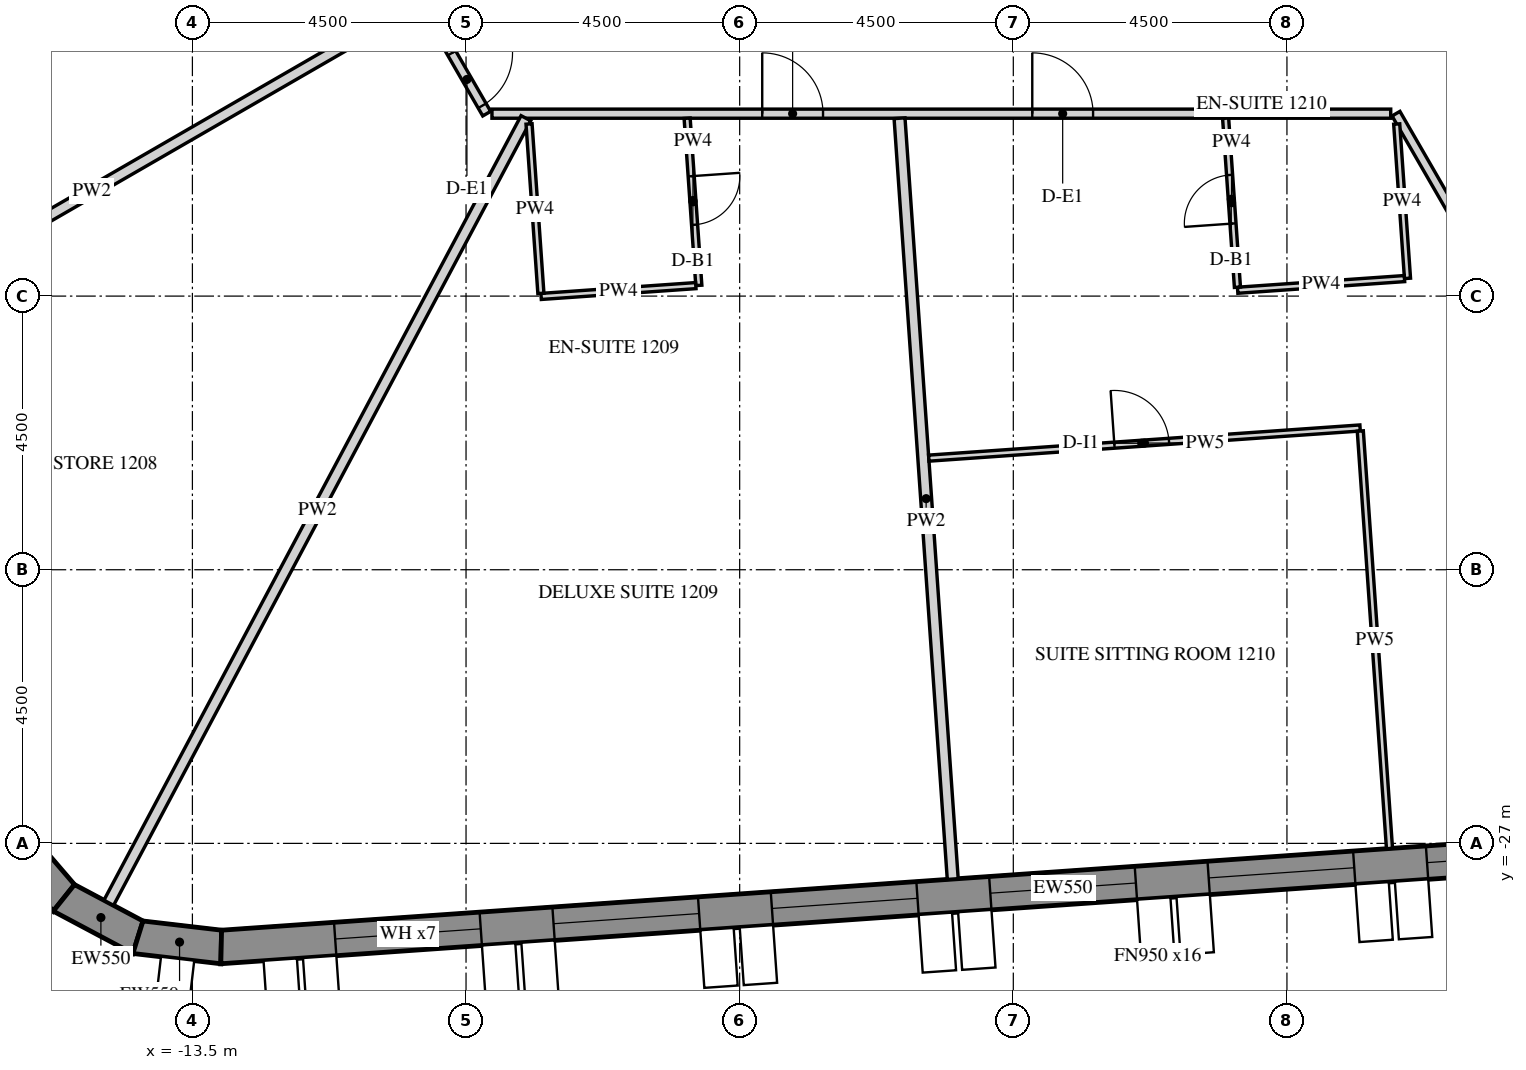
"""IFC4 building model, lengths in metres.
Left out: names, types, materials, properties, quantities, classifications, styles, units other than length and angle.
Written with IfcOpenShell. Run it as: python <this file> out.ifc"""

import sys

from ifc_helpers import new_model, si_unit, direction, frame, frame_2d, origin, place, context, subcontext, project, spatial, polyline, rectangle, outline, extrude, element, fill, save


model = new_model("IFC4")
c1 = context("Model", 3, precision=1e-05, world=origin(), true_north=direction((0.0, 1.0)))
c2 = subcontext(c1, "Body", "Model", "MODEL_VIEW")
j1 = project(units=[si_unit("LENGTHUNIT", "METRE"), si_unit("PLANEANGLEUNIT", "RADIAN")], contexts=[c1])
p1 = place(None, origin())
s1 = spatial("IfcSite", under=j1, at=p1, CompositionType="ELEMENT")
p2 = place(p1, origin())
s2 = spatial("IfcBuilding", under=s1, at=p2, CompositionType="ELEMENT")
p3 = place(p2, frame((0.0, 0.0, 164.4)))
s3 = spatial("IfcBuildingStorey", under=s2, at=p3, CompositionType="ELEMENT", Elevation=164.4)
p4 = place(p3, frame((-16.512, -26.85, -0.15), z_axis=(0.0, 0.0, 1.0), x_axis=(0.651621950847, -0.758543890078, 0.0)))
e1 = element("IfcWall", 1, at=p4, inside=s3, PredefinedType="SOLIDWALL", context=c2, shape_type="SweptSolid", body=[
    extrude(outline(polyline([(-0.026, -0.275), (1.431, -0.275), (1.327, 0.275), (0.026, 0.275), (-0.026, -0.275)])), origin(), (0.0, 0.0, 1.0), 3.9),
])
p5 = place(p3, frame((-15.614, -27.896, -0.15), z_axis=(0.0, 0.0, 1.0), x_axis=(0.882994189209, -0.469383917304, 0.0)))
e2 = element("IfcWall", 2, at=p5, inside=s3, PredefinedType="SOLIDWALL", context=c2, shape_type="SweptSolid", body=[
    extrude(outline(polyline([(-0.052, -0.275), (1.431, -0.275), (1.327, 0.275), (0.052, 0.275), (-0.052, -0.275)])), origin(), (0.0, 0.0, 1.0), 3.9),
])
p6 = place(p3, frame((-14.396, -28.543, -0.15), z_axis=(0.0, 0.0, 1.0), x_axis=(0.993232537394, -0.11614269956, 0.0)))
e3 = element("IfcWall", 3, at=p6, inside=s3, PredefinedType="SOLIDWALL", context=c2, shape_type="SweptSolid", body=[
    extrude(outline(polyline([(-0.052, -0.275), (1.405, -0.275), (1.353, 0.275), (0.052, 0.275), (-0.052, -0.275)])), origin(), (0.0, 0.0, 1.0), 3.9),
])
p7 = place(p3, frame((-13.026, -28.704, -0.15), z_axis=(0.0, 0.0, 1.0), x_axis=(0.99756406806, 0.069756219185, 0.0)))
e4 = element("IfcWall", 4, at=p7, inside=s3, PredefinedType="SOLIDWALL", context=c2, shape_type="SweptSolid", body=[
    extrude(outline(polyline([(-0.026, -0.275), (27.78, -0.275), (27.735, 0.275), (0.026, 0.275), (-0.026, -0.275)])), origin(), (0.0, 0.0, 1.0), 3.9),
])
p8 = place(p7, frame((1.879, 0.0, 1.05)))
e5 = element("IfcOpeningElement", 5, at=p8, cuts=e4, PredefinedType="OPENING", context=c2, shape_type="SweptSolid", body=[
    extrude(rectangle(XDim=2.4, YDim=2.4, at=frame_2d((1.2, 1.2))), frame((0.0, 0.285, 0.0), z_axis=(0.0, -1.0, 0.0), x_axis=(1.0, 0.0, 0.0)), (0.0, 0.0, 1.0), 0.57),
])
p9 = place(p7, frame((5.479, 0.0, 1.05)))
e6 = element("IfcOpeningElement", 6, at=p9, cuts=e4, PredefinedType="OPENING", context=c2, shape_type="SweptSolid", body=[
    extrude(rectangle(XDim=2.4, YDim=2.4, at=frame_2d((1.2, 1.2))), frame((0.0, 0.285, 0.0), z_axis=(0.0, -1.0, 0.0), x_axis=(1.0, 0.0, 0.0)), (0.0, 0.0, 1.0), 0.57),
])
p10 = place(p7, frame((9.079, 0.0, 1.05)))
e7 = element("IfcOpeningElement", 7, at=p10, cuts=e4, PredefinedType="OPENING", context=c2, shape_type="SweptSolid", body=[
    extrude(rectangle(XDim=2.4, YDim=2.4, at=frame_2d((1.2, 1.2))), frame((0.0, 0.285, 0.0), z_axis=(0.0, -1.0, 0.0), x_axis=(1.0, 0.0, 0.0)), (0.0, 0.0, 1.0), 0.57),
])
p11 = place(p7, frame((12.679, 0.0, 1.05)))
e8 = element("IfcOpeningElement", 8, at=p11, cuts=e4, PredefinedType="OPENING", context=c2, shape_type="SweptSolid", body=[
    extrude(rectangle(XDim=2.4, YDim=2.4, at=frame_2d((1.2, 1.2))), frame((0.0, 0.285, 0.0), z_axis=(0.0, -1.0, 0.0), x_axis=(1.0, 0.0, 0.0)), (0.0, 0.0, 1.0), 0.57),
])
p12 = place(p7, frame((16.279, 0.0, 1.05)))
e9 = element("IfcOpeningElement", 9, at=p12, cuts=e4, PredefinedType="OPENING", context=c2, shape_type="SweptSolid", body=[
    extrude(rectangle(XDim=2.4, YDim=2.4, at=frame_2d((1.2, 1.2))), frame((0.0, 0.285, 0.0), z_axis=(0.0, -1.0, 0.0), x_axis=(1.0, 0.0, 0.0)), (0.0, 0.0, 1.0), 0.57),
])
p13 = place(p7, frame((19.879, 0.0, 1.05)))
e10 = element("IfcOpeningElement", 10, at=p13, cuts=e4, PredefinedType="OPENING", context=c2, shape_type="SweptSolid", body=[
    extrude(rectangle(XDim=2.4, YDim=2.4, at=frame_2d((1.2, 1.2))), frame((0.0, 0.285, 0.0), z_axis=(0.0, -1.0, 0.0), x_axis=(1.0, 0.0, 0.0)), (0.0, 0.0, 1.0), 0.57),
])
p14 = place(p7, frame((23.479, 0.0, 1.05)))
e11 = element("IfcOpeningElement", 11, at=p14, cuts=e4, PredefinedType="OPENING", context=c2, shape_type="SweptSolid", body=[
    extrude(rectangle(XDim=2.4, YDim=2.4, at=frame_2d((1.2, 1.2))), frame((0.0, 0.285, 0.0), z_axis=(0.0, -1.0, 0.0), x_axis=(1.0, 0.0, 0.0)), (0.0, 0.0, 1.0), 0.57),
])
p15 = place(p3, frame((-16.094, -2.125, 0.0), z_axis=(0.0, 0.0, 1.0), x_axis=(0.500010545262, -0.866019315389, 0.0)))
e12 = element("IfcWall", 12, at=p15, inside=s3, PredefinedType="PARTITIONING", context=c2, shape_type="SweptSolid", body=[
    extrude(rectangle(XDim=14.867, YDim=0.15, at=frame_2d((7.434, 0.0))), origin(), (0.0, 0.0, 1.0), 2.988),
])
p16 = place(p15, frame((3.619, 0.0, 0.0)))
e13 = element("IfcOpeningElement", 13, at=p16, cuts=e12, PredefinedType="OPENING", context=c2, shape_type="SweptSolid", body=[
    extrude(rectangle(XDim=1.0, YDim=2.1, at=frame_2d((0.5, 1.05))), frame((0.0, 0.085, 0.0), z_axis=(0.0, -1.0, 0.0), x_axis=(1.0, 0.0, 0.0)), (0.0, 0.0, 1.0), 0.17),
])
p17 = place(p15, frame((9.924, 0.0, 0.0)))
e14 = element("IfcOpeningElement", 14, at=p17, cuts=e12, PredefinedType="OPENING", context=c2, shape_type="SweptSolid", body=[
    extrude(rectangle(XDim=1.0, YDim=2.1, at=frame_2d((0.5, 1.05))), frame((0.0, 0.085, 0.0), z_axis=(0.0, -1.0, 0.0), x_axis=(1.0, 0.0, 0.0)), (0.0, 0.0, 1.0), 0.17),
])
p18 = place(p15, frame((13.717, 0.0, 0.0)))
e15 = element("IfcOpeningElement", 15, at=p18, cuts=e12, PredefinedType="OPENING", context=c2, shape_type="SweptSolid", body=[
    extrude(rectangle(XDim=1.0, YDim=2.1, at=frame_2d((0.5, 1.05))), frame((0.0, 0.085, 0.0), z_axis=(0.0, -1.0, 0.0), x_axis=(1.0, 0.0, 0.0)), (0.0, 0.0, 1.0), 0.17),
])
p19 = place(p3, frame((-8.574, -15.0, 0.0), z_axis=(0.0, 0.0, 1.0), x_axis=(1.0, 0.0, 0.0)))
e16 = element("IfcWall", 16, at=p19, inside=s3, PredefinedType="PARTITIONING", context=c2, shape_type="SweptSolid", body=[
    extrude(rectangle(XDim=14.78, YDim=0.15, at=frame_2d((7.39, 0.0))), origin(), (0.0, 0.0, 1.0), 2.988),
])
p20 = place(p19, frame((4.445, 0.0, 0.0)))
e17 = element("IfcOpeningElement", 17, at=p20, cuts=e16, PredefinedType="OPENING", context=c2, shape_type="SweptSolid", body=[
    extrude(rectangle(XDim=1.0, YDim=2.1, at=frame_2d((0.5, 1.05))), frame((0.0, 0.085, 0.0), z_axis=(0.0, -1.0, 0.0), x_axis=(1.0, 0.0, 0.0)), (0.0, 0.0, 1.0), 0.17),
])
p21 = place(p19, frame((8.885, 0.0, 0.0)))
e18 = element("IfcOpeningElement", 18, at=p21, cuts=e16, PredefinedType="OPENING", context=c2, shape_type="SweptSolid", body=[
    extrude(rectangle(XDim=1.0, YDim=2.1, at=frame_2d((0.5, 1.05))), frame((0.0, 0.085, 0.0), z_axis=(0.0, -1.0, 0.0), x_axis=(1.0, 0.0, 0.0)), (0.0, 0.0, 1.0), 0.17),
])
p22 = place(p3, frame((6.293, -15.0, 0.0), z_axis=(0.0, 0.0, 1.0), x_axis=(0.499980313799, -0.86603676932, 0.0)))
e19 = element("IfcWall", 19, at=p22, inside=s3, PredefinedType="PARTITIONING", context=c2, shape_type="SweptSolid", body=[
    extrude(rectangle(XDim=7.786, YDim=0.15, at=frame_2d((3.893, 0.0))), origin(), (0.0, 0.0, 1.0), 2.988),
])
p23 = place(p3, frame((-20.513, -19.37, 0.0), z_axis=(0.0, 0.0, 1.0), x_axis=(0.866024931941, 0.500000817256, 0.0)))
e20 = element("IfcWall", 20, at=p23, inside=s3, PredefinedType="PARTITIONING", context=c2, shape_type="SweptSolid", body=[
    extrude(rectangle(XDim=12.375, YDim=0.18, at=frame_2d((6.188, 0.0))), origin(), (0.0, 0.0, 1.0), 2.988),
])
p24 = place(p3, frame((-14.876, -27.977, 0.0), z_axis=(0.0, 0.0, 1.0), x_axis=(0.469468328163, 0.882949312731, 0.0)))
e21 = element("IfcWall", 21, at=p24, inside=s3, PredefinedType="PARTITIONING", context=c2, shape_type="SweptSolid", body=[
    extrude(rectangle(XDim=14.613, YDim=0.18, at=frame_2d((7.306, 0.0))), origin(), (0.0, 0.0, 1.0), 2.988),
])
p25 = place(p3, frame((-5.364, -15.075, 0.0), z_axis=(0.0, 0.0, 1.0), x_axis=(0.06972333312, -0.997566367125, 0.0)))
e22 = element("IfcWall", 22, at=p25, inside=s3, PredefinedType="PARTITIONING", context=c2, shape_type="SweptSolid", body=[
    extrude(rectangle(XDim=2.756, YDim=0.1, at=frame_2d((1.378, 0.0))), origin(), (0.0, 0.0, 1.0), 2.988),
])
p26 = place(p25, frame((0.956, 0.0, 0.0)))
e23 = element("IfcOpeningElement", 23, at=p26, cuts=e22, PredefinedType="OPENING", context=c2, shape_type="SweptSolid", body=[
    extrude(rectangle(XDim=0.8, YDim=2.1, at=frame_2d((0.4, 1.05))), frame((0.0, 0.06, 0.0), z_axis=(0.0, -1.0, 0.0), x_axis=(1.0, 0.0, 0.0)), (0.0, 0.0, 1.0), 0.12),
])
p27 = place(p3, frame((-5.222, -17.828, 0.0), z_axis=(0.0, 0.0, 1.0), x_axis=(-0.997567829494, -0.069702407128, 0.0)))
e24 = element("IfcWall", 24, at=p27, inside=s3, PredefinedType="PARTITIONING", context=c2, shape_type="SweptSolid", body=[
    extrude(rectangle(XDim=2.55, YDim=0.1, at=frame_2d((1.275, 0.0))), origin(), (0.0, 0.0, 1.0), 2.988),
])
p28 = place(p3, frame((-7.769, -17.956, 0.0), z_axis=(0.0, 0.0, 1.0), x_axis=(-0.069756058123, 0.997564079323, 0.0)))
e25 = element("IfcWall", 25, at=p28, inside=s3, PredefinedType="PARTITIONING", context=c2, shape_type="SweptSolid", body=[
    extrude(rectangle(XDim=2.793, YDim=0.1, at=frame_2d((1.396, 0.0))), origin(), (0.0, 0.0, 1.0), 2.988),
])
p29 = place(p3, frame((-0.996, -27.587, 0.0), z_axis=(0.0, 0.0, 1.0), x_axis=(-0.069744671963, 0.997564875451, 0.0)))
e26 = element("IfcWall", 26, at=p29, inside=s3, PredefinedType="PARTITIONING", context=c2, shape_type="SweptSolid", body=[
    extrude(rectangle(XDim=12.542, YDim=0.18, at=frame_2d((6.271, 0.0))), origin(), (0.0, 0.0, 1.0), 2.988),
])
p30 = place(p3, frame((6.305, -15.171, 0.0), z_axis=(0.0, 0.0, 1.0), x_axis=(0.069671554491, -0.99756998476, 0.0)))
e27 = element("IfcWall", 27, at=p30, inside=s3, PredefinedType="PARTITIONING", context=c2, shape_type="SweptSolid", body=[
    extrude(rectangle(XDim=2.544, YDim=0.1, at=frame_2d((1.272, 0.0))), origin(), (0.0, 0.0, 1.0), 2.988),
])
p31 = place(p3, frame((6.433, -17.712, 0.0), z_axis=(0.0, 0.0, 1.0), x_axis=(-0.997562614302, -0.069777005859, 0.0)))
e28 = element("IfcWall", 28, at=p31, inside=s3, PredefinedType="PARTITIONING", context=c2, shape_type="SweptSolid", body=[
    extrude(rectangle(XDim=2.75, YDim=0.1, at=frame_2d((1.375, 0.0))), origin(), (0.0, 0.0, 1.0), 2.988),
])
p32 = place(p3, frame((3.686, -17.854, 0.0), z_axis=(0.0, 0.0, 1.0), x_axis=(-0.069758488261, 0.997563909389, 0.0)))
e29 = element("IfcWall", 29, at=p32, inside=s3, PredefinedType="PARTITIONING", context=c2, shape_type="SweptSolid", body=[
    extrude(rectangle(XDim=2.786, YDim=0.1, at=frame_2d((1.393, 0.0))), origin(), (0.0, 0.0, 1.0), 2.988),
])
p33 = place(p32, frame((1.05, 0.0, 0.0)))
e30 = element("IfcOpeningElement", 30, at=p33, cuts=e29, PredefinedType="OPENING", context=c2, shape_type="SweptSolid", body=[
    extrude(rectangle(XDim=0.8, YDim=2.1, at=frame_2d((0.4, 1.05))), frame((0.0, 0.06, 0.0), z_axis=(0.0, -1.0, 0.0), x_axis=(1.0, 0.0, 0.0)), (0.0, 0.0, 1.0), 0.12),
])
p34 = place(p3, frame((-1.39, -20.665, 0.0), z_axis=(0.0, 0.0, 1.0), x_axis=(0.997565277642, 0.069738919141, 0.0)))
e31 = element("IfcWall", 31, at=p34, inside=s3, PredefinedType="PARTITIONING", context=c2, shape_type="SweptSolid", body=[
    extrude(rectangle(XDim=7.11, YDim=0.1, at=frame_2d((3.555, 0.0))), origin(), (0.0, 0.0, 1.0), 2.988),
])
p35 = place(p34, frame((3.06, 0.0, 0.0)))
e32 = element("IfcOpeningElement", 32, at=p35, cuts=e31, PredefinedType="OPENING", context=c2, shape_type="SweptSolid", body=[
    extrude(rectangle(XDim=0.9, YDim=2.1, at=frame_2d((0.45, 1.05))), frame((0.0, 0.06, 0.0), z_axis=(0.0, -1.0, 0.0), x_axis=(1.0, 0.0, 0.0)), (0.0, 0.0, 1.0), 0.12),
])
p36 = place(p3, frame((5.706, -20.219, 0.0), z_axis=(0.0, 0.0, 1.0), x_axis=(0.069774766037, -0.99756277097, 0.0)))
e33 = element("IfcWall", 33, at=p36, inside=s3, PredefinedType="PARTITIONING", context=c2, shape_type="SweptSolid", body=[
    extrude(rectangle(XDim=6.883, YDim=0.1, at=frame_2d((3.441, 0.0))), origin(), (0.0, 0.0, 1.0), 2.988),
])
p37 = place(p8, frame((0.0, 0.205, 0.0)))
e34 = element("IfcWindow", 34, at=p37, inside=s3, PartitioningType="DOUBLE_PANEL_VERTICAL", PredefinedType="WINDOW", context=c2, shape_type="SweptSolid", body=[
    extrude(rectangle(XDim=2.4, YDim=2.4, at=frame_2d((1.2, 1.2))), frame((0.0, 0.03, 0.0), z_axis=(0.0, -1.0, 0.0), x_axis=(1.0, 0.0, 0.0)), (0.0, 0.0, 1.0), 0.06),
])
fill(e5, e34)
p38 = place(p9, frame((0.0, 0.205, 0.0)))
e35 = element("IfcWindow", 35, at=p38, inside=s3, PartitioningType="DOUBLE_PANEL_VERTICAL", PredefinedType="WINDOW", context=c2, shape_type="SweptSolid", body=[
    extrude(rectangle(XDim=2.4, YDim=2.4, at=frame_2d((1.2, 1.2))), frame((0.0, 0.03, 0.0), z_axis=(0.0, -1.0, 0.0), x_axis=(1.0, 0.0, 0.0)), (0.0, 0.0, 1.0), 0.06),
])
fill(e6, e35)
p39 = place(p10, frame((0.0, 0.205, 0.0)))
e36 = element("IfcWindow", 36, at=p39, inside=s3, PartitioningType="DOUBLE_PANEL_VERTICAL", PredefinedType="WINDOW", context=c2, shape_type="SweptSolid", body=[
    extrude(rectangle(XDim=2.4, YDim=2.4, at=frame_2d((1.2, 1.2))), frame((0.0, 0.03, 0.0), z_axis=(0.0, -1.0, 0.0), x_axis=(1.0, 0.0, 0.0)), (0.0, 0.0, 1.0), 0.06),
])
fill(e7, e36)
p40 = place(p11, frame((0.0, 0.205, 0.0)))
e37 = element("IfcWindow", 37, at=p40, inside=s3, PartitioningType="DOUBLE_PANEL_VERTICAL", PredefinedType="WINDOW", context=c2, shape_type="SweptSolid", body=[
    extrude(rectangle(XDim=2.4, YDim=2.4, at=frame_2d((1.2, 1.2))), frame((0.0, 0.03, 0.0), z_axis=(0.0, -1.0, 0.0), x_axis=(1.0, 0.0, 0.0)), (0.0, 0.0, 1.0), 0.06),
])
fill(e8, e37)
p41 = place(p12, frame((0.0, 0.205, 0.0)))
e38 = element("IfcWindow", 38, at=p41, inside=s3, PartitioningType="DOUBLE_PANEL_VERTICAL", PredefinedType="WINDOW", context=c2, shape_type="SweptSolid", body=[
    extrude(rectangle(XDim=2.4, YDim=2.4, at=frame_2d((1.2, 1.2))), frame((0.0, 0.03, 0.0), z_axis=(0.0, -1.0, 0.0), x_axis=(1.0, 0.0, 0.0)), (0.0, 0.0, 1.0), 0.06),
])
fill(e9, e38)
p42 = place(p13, frame((0.0, 0.205, 0.0)))
e39 = element("IfcWindow", 39, at=p42, inside=s3, PartitioningType="DOUBLE_PANEL_VERTICAL", PredefinedType="WINDOW", context=c2, shape_type="SweptSolid", body=[
    extrude(rectangle(XDim=2.4, YDim=2.4, at=frame_2d((1.2, 1.2))), frame((0.0, 0.03, 0.0), z_axis=(0.0, -1.0, 0.0), x_axis=(1.0, 0.0, 0.0)), (0.0, 0.0, 1.0), 0.06),
])
fill(e10, e39)
p43 = place(p18, origin())
e40 = element("IfcDoor", 40, at=p43, inside=s3, OperationType="SINGLE_SWING_LEFT", PredefinedType="DOOR", context=c2, shape_type="SweptSolid", body=[
    extrude(rectangle(XDim=1.0, YDim=2.1, at=frame_2d((0.5, 1.05))), frame((0.0, 0.025, 0.0), z_axis=(0.0, -1.0, 0.0), x_axis=(1.0, 0.0, 0.0)), (0.0, 0.0, 1.0), 0.05),
])
fill(e15, e40)
p44 = place(p20, origin())
e41 = element("IfcDoor", 41, at=p44, inside=s3, OperationType="SINGLE_SWING_LEFT", PredefinedType="DOOR", context=c2, shape_type="SweptSolid", body=[
    extrude(rectangle(XDim=1.0, YDim=2.1, at=frame_2d((0.5, 1.05))), frame((0.0, 0.025, 0.0), z_axis=(0.0, -1.0, 0.0), x_axis=(1.0, 0.0, 0.0)), (0.0, 0.0, 1.0), 0.05),
])
fill(e17, e41)
p45 = place(p26, origin())
e42 = element("IfcDoor", 42, at=p45, inside=s3, OperationType="SINGLE_SWING_LEFT", PredefinedType="DOOR", context=c2, shape_type="SweptSolid", body=[
    extrude(rectangle(XDim=0.8, YDim=2.1, at=frame_2d((0.4, 1.05))), frame((0.0, 0.025, 0.0), z_axis=(0.0, -1.0, 0.0), x_axis=(1.0, 0.0, 0.0)), (0.0, 0.0, 1.0), 0.05),
])
fill(e23, e42)
p46 = place(p21, origin())
e43 = element("IfcDoor", 43, at=p46, inside=s3, OperationType="SINGLE_SWING_RIGHT", PredefinedType="DOOR", context=c2, shape_type="SweptSolid", body=[
    extrude(rectangle(XDim=1.0, YDim=2.1, at=frame_2d((0.5, 1.05))), frame((0.0, 0.025, 0.0), z_axis=(0.0, -1.0, 0.0), x_axis=(1.0, 0.0, 0.0)), (0.0, 0.0, 1.0), 0.05),
])
fill(e18, e43)
p47 = place(p33, origin())
e44 = element("IfcDoor", 44, at=p47, inside=s3, OperationType="SINGLE_SWING_LEFT", PredefinedType="DOOR", context=c2, shape_type="SweptSolid", body=[
    extrude(rectangle(XDim=0.8, YDim=2.1, at=frame_2d((0.4, 1.05))), frame((0.0, 0.025, 0.0), z_axis=(0.0, -1.0, 0.0), x_axis=(1.0, 0.0, 0.0)), (0.0, 0.0, 1.0), 0.05),
])
fill(e30, e44)
p48 = place(p35, origin())
e45 = element("IfcDoor", 45, at=p48, inside=s3, OperationType="SINGLE_SWING_RIGHT", PredefinedType="DOOR", context=c2, shape_type="SweptSolid", body=[
    extrude(rectangle(XDim=0.9, YDim=2.1, at=frame_2d((0.45, 1.05))), frame((0.0, 0.025, 0.0), z_axis=(0.0, -1.0, 0.0), x_axis=(1.0, 0.0, 0.0)), (0.0, 0.0, 1.0), 0.05),
])
fill(e32, e45)
save(model, sys.argv[1])
